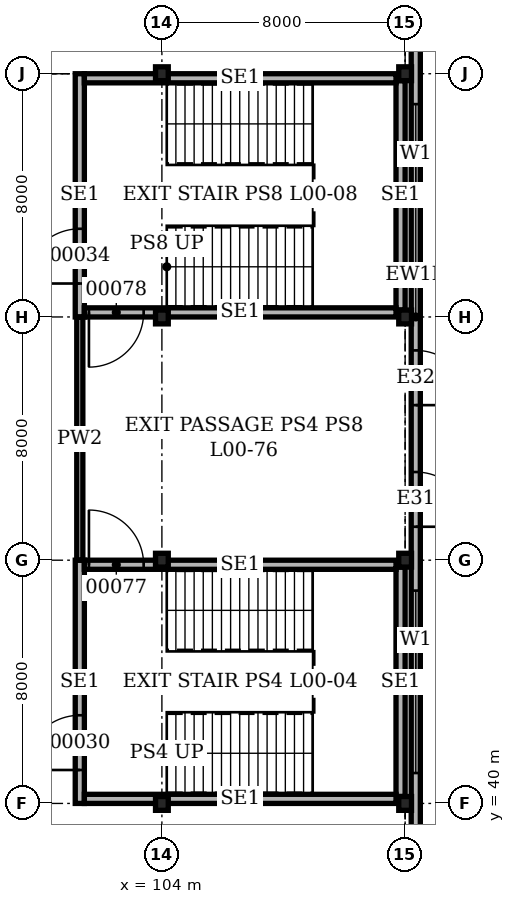
"""IFC4 building model, lengths in metres.
Left out: names, types, materials, properties, quantities, classifications, styles, units other than length and angle.
Written with IfcOpenShell. Run it as: python <this file> out.ifc"""

import sys

from ifc_helpers import new_model, si_unit, direction, frame, frame_2d, origin, origin_2d, place, context, subcontext, project, spatial, rectangle, i_section, extrude, element, fill, save


model = new_model("IFC4")
c1 = context("Model", 3, precision=1e-05, world=origin(), true_north=direction((0.0, 1.0)))
c2 = subcontext(c1, "Body", "Model", "MODEL_VIEW")
j1 = project(units=[si_unit("LENGTHUNIT", "METRE"), si_unit("PLANEANGLEUNIT", "RADIAN")], contexts=[c1])
p1 = place(None, origin())
s1 = spatial("IfcSite", under=j1, at=p1, CompositionType="ELEMENT")
p2 = place(p1, origin())
s2 = spatial("IfcBuilding", under=s1, at=p2, CompositionType="ELEMENT")
p3 = place(p2, origin())
s3 = spatial("IfcBuildingStorey", under=s2, at=p3, CompositionType="ELEMENT", Elevation=0.0)
for number, where, z_axis, x_axis in (
    (1, (104.0, 40.0, 0.0), (0.0, 0.0, 1.0), (1.0, 0.0, 0.0)),
    (2, (104.0, 48.0, 0.0), (0.0, 0.0, 1.0), (1.0, 0.0, 0.0)),
    (3, (104.0, 56.0, 0.0), (0.0, 0.0, 1.0), (1.0, 0.0, 0.0)),
    (4, (104.0, 64.0, 0.0), (0.0, 0.0, 1.0), (1.0, 0.0, 0.0)),
    (5, (112.0, 40.0, 0.0), (0.0, 0.0, 1.0), (1.0, 0.0, 0.0)),
    (6, (112.0, 48.0, 0.0), (0.0, 0.0, 1.0), (1.0, 0.0, 0.0)),
    (7, (112.0, 56.0, 0.0), (0.0, 0.0, 1.0), (1.0, 0.0, 0.0)),
    (8, (112.0, 64.0, 0.0), (0.0, 0.0, 1.0), (1.0, 0.0, 0.0)),
):
    element("IfcColumn", number, at=place(p3, frame(where, z_axis=z_axis, x_axis=x_axis)), inside=s3, PredefinedType="COLUMN", context=c2, shape_type="SweptSolid", body=[
        extrude(i_section(OverallWidth=0.419, OverallDepth=0.455, WebThickness=0.042, FlangeThickness=0.068, at=origin_2d()), origin(), (0.0, 0.0, 1.0), 4.9),
    ])
p4 = place(p3, frame((112.35, -0.35, 0.0), z_axis=(0.0, 0.0, 1.0), x_axis=(0.0, 1.0, 0.0)))
e9 = element("IfcWall", 9, at=p4, inside=s3, PredefinedType="SOLIDWALL", context=c2, shape_type="SweptSolid", body=[
    extrude(rectangle(XDim=112.7, YDim=0.3, at=frame_2d((56.35, 0.0))), origin(), (0.0, 0.0, 1.0), 4.9),
])
p5 = place(p4, frame((3.45, 0.0, 0.0)))
e10 = element("IfcOpeningElement", 10, at=p5, cuts=e9, PredefinedType="OPENING", context=c2, shape_type="SweptSolid", body=[
    extrude(rectangle(XDim=1.8, YDim=2.4, at=frame_2d((0.9, 1.2))), frame((0.0, 0.16, 0.0), z_axis=(0.0, -1.0, 0.0), x_axis=(1.0, 0.0, 0.0)), (0.0, 0.0, 1.0), 0.32),
])
p6 = place(p4, frame((11.45, 0.0, 0.0)))
e11 = element("IfcOpeningElement", 11, at=p6, cuts=e9, PredefinedType="OPENING", context=c2, shape_type="SweptSolid", body=[
    extrude(rectangle(XDim=1.8, YDim=2.4, at=frame_2d((0.9, 1.2))), frame((0.0, 0.16, 0.0), z_axis=(0.0, -1.0, 0.0), x_axis=(1.0, 0.0, 0.0)), (0.0, 0.0, 1.0), 0.32),
])
p7 = place(p4, frame((17.35, 0.0, 1.2)))
e12 = element("IfcOpeningElement", 12, at=p7, cuts=e9, PredefinedType="OPENING", context=c2, shape_type="SweptSolid", body=[
    extrude(rectangle(XDim=6.0, YDim=1.5, at=frame_2d((3.0, 0.75))), frame((0.0, 0.16, 0.0), z_axis=(0.0, -1.0, 0.0), x_axis=(1.0, 0.0, 0.0)), (0.0, 0.0, 1.0), 0.32),
])
p8 = place(p4, frame((25.35, 0.0, 1.2)))
e13 = element("IfcOpeningElement", 13, at=p8, cuts=e9, PredefinedType="OPENING", context=c2, shape_type="SweptSolid", body=[
    extrude(rectangle(XDim=6.0, YDim=1.5, at=frame_2d((3.0, 0.75))), frame((0.0, 0.16, 0.0), z_axis=(0.0, -1.0, 0.0), x_axis=(1.0, 0.0, 0.0)), (0.0, 0.0, 1.0), 0.32),
])
p9 = place(p4, frame((33.35, 0.0, 1.2)))
e14 = element("IfcOpeningElement", 14, at=p9, cuts=e9, PredefinedType="OPENING", context=c2, shape_type="SweptSolid", body=[
    extrude(rectangle(XDim=6.0, YDim=1.5, at=frame_2d((3.0, 0.75))), frame((0.0, 0.16, 0.0), z_axis=(0.0, -1.0, 0.0), x_axis=(1.0, 0.0, 0.0)), (0.0, 0.0, 1.0), 0.32),
])
p10 = place(p4, frame((41.35, 0.0, 1.2)))
e15 = element("IfcOpeningElement", 15, at=p10, cuts=e9, PredefinedType="OPENING", context=c2, shape_type="SweptSolid", body=[
    extrude(rectangle(XDim=6.0, YDim=1.5, at=frame_2d((3.0, 0.75))), frame((0.0, 0.16, 0.0), z_axis=(0.0, -1.0, 0.0), x_axis=(1.0, 0.0, 0.0)), (0.0, 0.0, 1.0), 0.32),
])
p11 = place(p4, frame((49.45, 0.0, 0.0)))
e16 = element("IfcOpeningElement", 16, at=p11, cuts=e9, PredefinedType="OPENING", context=c2, shape_type="SweptSolid", body=[
    extrude(rectangle(XDim=1.8, YDim=2.4, at=frame_2d((0.9, 1.2))), frame((0.0, 0.16, 0.0), z_axis=(0.0, -1.0, 0.0), x_axis=(1.0, 0.0, 0.0)), (0.0, 0.0, 1.0), 0.32),
])
p12 = place(p4, frame((53.45, 0.0, 0.0)))
e17 = element("IfcOpeningElement", 17, at=p12, cuts=e9, PredefinedType="OPENING", context=c2, shape_type="SweptSolid", body=[
    extrude(rectangle(XDim=1.8, YDim=2.4, at=frame_2d((0.9, 1.2))), frame((0.0, 0.16, 0.0), z_axis=(0.0, -1.0, 0.0), x_axis=(1.0, 0.0, 0.0)), (0.0, 0.0, 1.0), 0.32),
])
p13 = place(p4, frame((57.35, 0.0, 1.2)))
e18 = element("IfcOpeningElement", 18, at=p13, cuts=e9, PredefinedType="OPENING", context=c2, shape_type="SweptSolid", body=[
    extrude(rectangle(XDim=6.0, YDim=1.5, at=frame_2d((3.0, 0.75))), frame((0.0, 0.16, 0.0), z_axis=(0.0, -1.0, 0.0), x_axis=(1.0, 0.0, 0.0)), (0.0, 0.0, 1.0), 0.32),
])
p14 = place(p4, frame((65.15, 0.0, 0.0)))
e19 = element("IfcOpeningElement", 19, at=p14, cuts=e9, PredefinedType="OPENING", context=c2, shape_type="SweptSolid", body=[
    extrude(rectangle(XDim=2.4, YDim=3.0, at=frame_2d((1.2, 1.5))), frame((0.0, 0.16, 0.0), z_axis=(0.0, -1.0, 0.0), x_axis=(1.0, 0.0, 0.0)), (0.0, 0.0, 1.0), 0.32),
])
p15 = place(p4, frame((69.15, 0.0, 0.0)))
e20 = element("IfcOpeningElement", 20, at=p15, cuts=e9, PredefinedType="OPENING", context=c2, shape_type="SweptSolid", body=[
    extrude(rectangle(XDim=2.4, YDim=3.0, at=frame_2d((1.2, 1.5))), frame((0.0, 0.16, 0.0), z_axis=(0.0, -1.0, 0.0), x_axis=(1.0, 0.0, 0.0)), (0.0, 0.0, 1.0), 0.32),
])
p16 = place(p4, frame((74.05, 0.0, 0.0)))
e21 = element("IfcOpeningElement", 21, at=p16, cuts=e9, PredefinedType="OPENING", context=c2, shape_type="SweptSolid", body=[
    extrude(rectangle(XDim=1.8, YDim=2.4, at=frame_2d((0.9, 1.2))), frame((0.0, 0.16, 0.0), z_axis=(0.0, -1.0, 0.0), x_axis=(1.0, 0.0, 0.0)), (0.0, 0.0, 1.0), 0.32),
])
p17 = place(p4, frame((81.35, 0.0, 1.2)))
e22 = element("IfcOpeningElement", 22, at=p17, cuts=e9, PredefinedType="OPENING", context=c2, shape_type="SweptSolid", body=[
    extrude(rectangle(XDim=6.0, YDim=1.5, at=frame_2d((3.0, 0.75))), frame((0.0, 0.16, 0.0), z_axis=(0.0, -1.0, 0.0), x_axis=(1.0, 0.0, 0.0)), (0.0, 0.0, 1.0), 0.32),
])
p18 = place(p4, frame((90.35, 0.0, 0.0)))
e23 = element("IfcOpeningElement", 23, at=p18, cuts=e9, PredefinedType="OPENING", context=c2, shape_type="SweptSolid", body=[
    extrude(rectangle(XDim=4.0, YDim=4.5, at=frame_2d((2.0, 2.25))), frame((0.0, 0.16, 0.0), z_axis=(0.0, -1.0, 0.0), x_axis=(1.0, 0.0, 0.0)), (0.0, 0.0, 1.0), 0.32),
])
p19 = place(p4, frame((98.35, 0.0, 0.0)))
e24 = element("IfcOpeningElement", 24, at=p19, cuts=e9, PredefinedType="OPENING", context=c2, shape_type="SweptSolid", body=[
    extrude(rectangle(XDim=4.0, YDim=4.5, at=frame_2d((2.0, 2.25))), frame((0.0, 0.16, 0.0), z_axis=(0.0, -1.0, 0.0), x_axis=(1.0, 0.0, 0.0)), (0.0, 0.0, 1.0), 0.32),
])
p20 = place(p4, frame((106.35, 0.0, 0.0)))
e25 = element("IfcOpeningElement", 25, at=p20, cuts=e9, PredefinedType="OPENING", context=c2, shape_type="SweptSolid", body=[
    extrude(rectangle(XDim=4.0, YDim=4.5, at=frame_2d((2.0, 2.25))), frame((0.0, 0.16, 0.0), z_axis=(0.0, -1.0, 0.0), x_axis=(1.0, 0.0, 0.0)), (0.0, 0.0, 1.0), 0.32),
])
p21 = place(p3, frame((101.3, 40.0, 0.0), z_axis=(0.0, 0.0, 1.0), x_axis=(0.0, 1.0, 0.0)))
e26 = element("IfcWall", 26, at=p21, inside=s3, PredefinedType="SOLIDWALL", context=c2, shape_type="SweptSolid", body=[
    extrude(rectangle(XDim=8.0, YDim=0.3, at=frame_2d((4.0, 0.0))), origin(), (0.0, 0.0, 1.0), 4.7),
])
p22 = place(p21, frame((1.1, 0.0, 0.0)))
e27 = element("IfcOpeningElement", 27, at=p22, cuts=e26, PredefinedType="OPENING", context=c2, shape_type="SweptSolid", body=[
    extrude(rectangle(XDim=1.8, YDim=2.1, at=frame_2d((0.9, 1.05))), frame((0.0, 0.16, 0.0), z_axis=(0.0, -1.0, 0.0), x_axis=(1.0, 0.0, 0.0)), (0.0, 0.0, 1.0), 0.32),
])
p23 = place(p3, frame((111.85, 40.227, 0.0), z_axis=(0.0, 0.0, 1.0), x_axis=(0.0, 1.0, 0.0)))
e28 = element("IfcWall", 28, at=p23, inside=s3, PredefinedType="SOLIDWALL", context=c2, shape_type="SweptSolid", body=[
    extrude(rectangle(XDim=7.545, YDim=0.3, at=frame_2d((3.773, 0.0))), origin(), (0.0, 0.0, 1.0), 4.7),
])
p24 = place(p3, frame((101.45, 40.15, 0.0), z_axis=(0.0, 0.0, 1.0), x_axis=(1.0, 0.0, 0.0)))
e29 = element("IfcWall", 29, at=p24, inside=s3, PredefinedType="SOLIDWALL", context=c2, shape_type="SweptSolid", body=[
    extrude(rectangle(XDim=10.25, YDim=0.3, at=frame_2d((5.125, 0.0))), origin(), (0.0, 0.0, 1.0), 4.7),
])
p25 = place(p3, frame((101.45, 47.85, 0.0), z_axis=(0.0, 0.0, 1.0), x_axis=(1.0, 0.0, 0.0)))
e30 = element("IfcWall", 30, at=p25, inside=s3, PredefinedType="SOLIDWALL", context=c2, shape_type="SweptSolid", body=[
    extrude(rectangle(XDim=10.25, YDim=0.3, at=frame_2d((5.125, 0.0))), origin(), (0.0, 0.0, 1.0), 4.7),
])
p26 = place(p25, frame((0.15, 0.0, 0.0)))
e31 = element("IfcOpeningElement", 31, at=p26, cuts=e30, PredefinedType="OPENING", context=c2, shape_type="SweptSolid", body=[
    extrude(rectangle(XDim=1.8, YDim=2.1, at=frame_2d((0.9, 1.05))), frame((0.0, 0.16, 0.0), z_axis=(0.0, -1.0, 0.0), x_axis=(1.0, 0.0, 0.0)), (0.0, 0.0, 1.0), 0.32),
])
p27 = place(p3, frame((101.3, 56.0, 0.0), z_axis=(0.0, 0.0, 1.0), x_axis=(0.0, 1.0, 0.0)))
e32 = element("IfcWall", 32, at=p27, inside=s3, PredefinedType="SOLIDWALL", context=c2, shape_type="SweptSolid", body=[
    extrude(rectangle(XDim=8.0, YDim=0.3, at=frame_2d((4.0, 0.0))), origin(), (0.0, 0.0, 1.0), 4.7),
])
p28 = place(p27, frame((1.1, 0.0, 0.0)))
e33 = element("IfcOpeningElement", 33, at=p28, cuts=e32, PredefinedType="OPENING", context=c2, shape_type="SweptSolid", body=[
    extrude(rectangle(XDim=1.8, YDim=2.1, at=frame_2d((0.9, 1.05))), frame((0.0, 0.16, 0.0), z_axis=(0.0, -1.0, 0.0), x_axis=(1.0, 0.0, 0.0)), (0.0, 0.0, 1.0), 0.32),
])
p29 = place(p3, frame((111.85, 56.227, 0.0), z_axis=(0.0, 0.0, 1.0), x_axis=(0.0, 1.0, 0.0)))
e34 = element("IfcWall", 34, at=p29, inside=s3, PredefinedType="SOLIDWALL", context=c2, shape_type="SweptSolid", body=[
    extrude(rectangle(XDim=7.545, YDim=0.3, at=frame_2d((3.773, 0.0))), origin(), (0.0, 0.0, 1.0), 4.7),
])
p30 = place(p3, frame((101.45, 56.15, 0.0), z_axis=(0.0, 0.0, 1.0), x_axis=(1.0, 0.0, 0.0)))
e35 = element("IfcWall", 35, at=p30, inside=s3, PredefinedType="SOLIDWALL", context=c2, shape_type="SweptSolid", body=[
    extrude(rectangle(XDim=10.25, YDim=0.3, at=frame_2d((5.125, 0.0))), origin(), (0.0, 0.0, 1.0), 4.7),
])
p31 = place(p30, frame((0.15, 0.0, 0.0)))
e36 = element("IfcOpeningElement", 36, at=p31, cuts=e35, PredefinedType="OPENING", context=c2, shape_type="SweptSolid", body=[
    extrude(rectangle(XDim=1.8, YDim=2.1, at=frame_2d((0.9, 1.05))), frame((0.0, 0.16, 0.0), z_axis=(0.0, -1.0, 0.0), x_axis=(1.0, 0.0, 0.0)), (0.0, 0.0, 1.0), 0.32),
])
p32 = place(p3, frame((101.45, 63.85, 0.0), z_axis=(0.0, 0.0, 1.0), x_axis=(1.0, 0.0, 0.0)))
e37 = element("IfcWall", 37, at=p32, inside=s3, PredefinedType="SOLIDWALL", context=c2, shape_type="SweptSolid", body=[
    extrude(rectangle(XDim=10.25, YDim=0.3, at=frame_2d((5.125, 0.0))), origin(), (0.0, 0.0, 1.0), 4.7),
])
p33 = place(p3, frame((101.3, 48.0, 0.0), z_axis=(0.0, 0.0, 1.0), x_axis=(0.0, 1.0, 0.0)))
e38 = element("IfcWall", 38, at=p33, inside=s3, PredefinedType="PARTITIONING", context=c2, shape_type="SweptSolid", body=[
    extrude(rectangle(XDim=8.0, YDim=0.2, at=frame_2d((4.0, 0.0))), origin(), (0.0, 0.0, 1.0), 4.7),
])
p34 = place(p10, origin())
e39 = element("IfcWindow", 39, at=p34, inside=s3, PartitioningType="SINGLE_PANEL", PredefinedType="WINDOW", context=c2, shape_type="SweptSolid", body=[
    extrude(rectangle(XDim=6.0, YDim=1.5, at=frame_2d((3.0, 0.75))), frame((0.0, 0.03, 0.0), z_axis=(0.0, -1.0, 0.0), x_axis=(1.0, 0.0, 0.0)), (0.0, 0.0, 1.0), 0.06),
])
fill(e15, e39)
p35 = place(p11, frame((1.8, 0.0, 0.0), z_axis=(0.0, 0.0, 1.0), x_axis=(-1.0, 0.0, 0.0)))
e40 = element("IfcDoor", 40, at=p35, inside=s3, OperationType="DOUBLE_DOOR_SINGLE_SWING", PredefinedType="DOOR", context=c2, shape_type="SweptSolid", body=[
    extrude(rectangle(XDim=1.8, YDim=2.4, at=frame_2d((0.9, 1.2))), frame((0.0, 0.15, 0.0), z_axis=(0.0, -1.0, 0.0), x_axis=(1.0, 0.0, 0.0)), (0.0, 0.0, 1.0), 0.3),
])
fill(e16, e40)
p36 = place(p12, frame((1.8, 0.0, 0.0), z_axis=(0.0, 0.0, 1.0), x_axis=(-1.0, 0.0, 0.0)))
e41 = element("IfcDoor", 41, at=p36, inside=s3, OperationType="DOUBLE_DOOR_SINGLE_SWING", PredefinedType="DOOR", context=c2, shape_type="SweptSolid", body=[
    extrude(rectangle(XDim=1.8, YDim=2.4, at=frame_2d((0.9, 1.2))), frame((0.0, 0.15, 0.0), z_axis=(0.0, -1.0, 0.0), x_axis=(1.0, 0.0, 0.0)), (0.0, 0.0, 1.0), 0.3),
])
fill(e17, e41)
p37 = place(p13, origin())
e42 = element("IfcWindow", 42, at=p37, inside=s3, PartitioningType="SINGLE_PANEL", PredefinedType="WINDOW", context=c2, shape_type="SweptSolid", body=[
    extrude(rectangle(XDim=6.0, YDim=1.5, at=frame_2d((3.0, 0.75))), frame((0.0, 0.03, 0.0), z_axis=(0.0, -1.0, 0.0), x_axis=(1.0, 0.0, 0.0)), (0.0, 0.0, 1.0), 0.06),
])
fill(e18, e42)
p38 = place(p22, origin())
e43 = element("IfcDoor", 43, at=p38, inside=s3, OperationType="DOUBLE_DOOR_SINGLE_SWING", PredefinedType="DOOR", context=c2, shape_type="SweptSolid", body=[
    extrude(rectangle(XDim=1.8, YDim=2.1, at=frame_2d((0.9, 1.05))), frame((0.0, 0.15, 0.0), z_axis=(0.0, -1.0, 0.0), x_axis=(1.0, 0.0, 0.0)), (0.0, 0.0, 1.0), 0.3),
])
fill(e27, e43)
p39 = place(p28, origin())
e44 = element("IfcDoor", 44, at=p39, inside=s3, OperationType="DOUBLE_DOOR_SINGLE_SWING", PredefinedType="DOOR", context=c2, shape_type="SweptSolid", body=[
    extrude(rectangle(XDim=1.8, YDim=2.1, at=frame_2d((0.9, 1.05))), frame((0.0, 0.15, 0.0), z_axis=(0.0, -1.0, 0.0), x_axis=(1.0, 0.0, 0.0)), (0.0, 0.0, 1.0), 0.3),
])
fill(e33, e44)
p40 = place(p26, origin())
e45 = element("IfcDoor", 45, at=p40, inside=s3, OperationType="DOUBLE_DOOR_SINGLE_SWING", PredefinedType="DOOR", context=c2, shape_type="SweptSolid", body=[
    extrude(rectangle(XDim=1.8, YDim=2.1, at=frame_2d((0.9, 1.05))), frame((0.0, 0.15, 0.0), z_axis=(0.0, -1.0, 0.0), x_axis=(1.0, 0.0, 0.0)), (0.0, 0.0, 1.0), 0.3),
])
fill(e31, e45)
p41 = place(p31, frame((1.8, 0.0, 0.0), z_axis=(0.0, 0.0, 1.0), x_axis=(-1.0, 0.0, 0.0)))
e46 = element("IfcDoor", 46, at=p41, inside=s3, OperationType="DOUBLE_DOOR_SINGLE_SWING", PredefinedType="DOOR", context=c2, shape_type="SweptSolid", body=[
    extrude(rectangle(XDim=1.8, YDim=2.1, at=frame_2d((0.9, 1.05))), frame((0.0, 0.15, 0.0), z_axis=(0.0, -1.0, 0.0), x_axis=(1.0, 0.0, 0.0)), (0.0, 0.0, 1.0), 0.3),
])
fill(e36, e46)
save(model, sys.argv[1])
